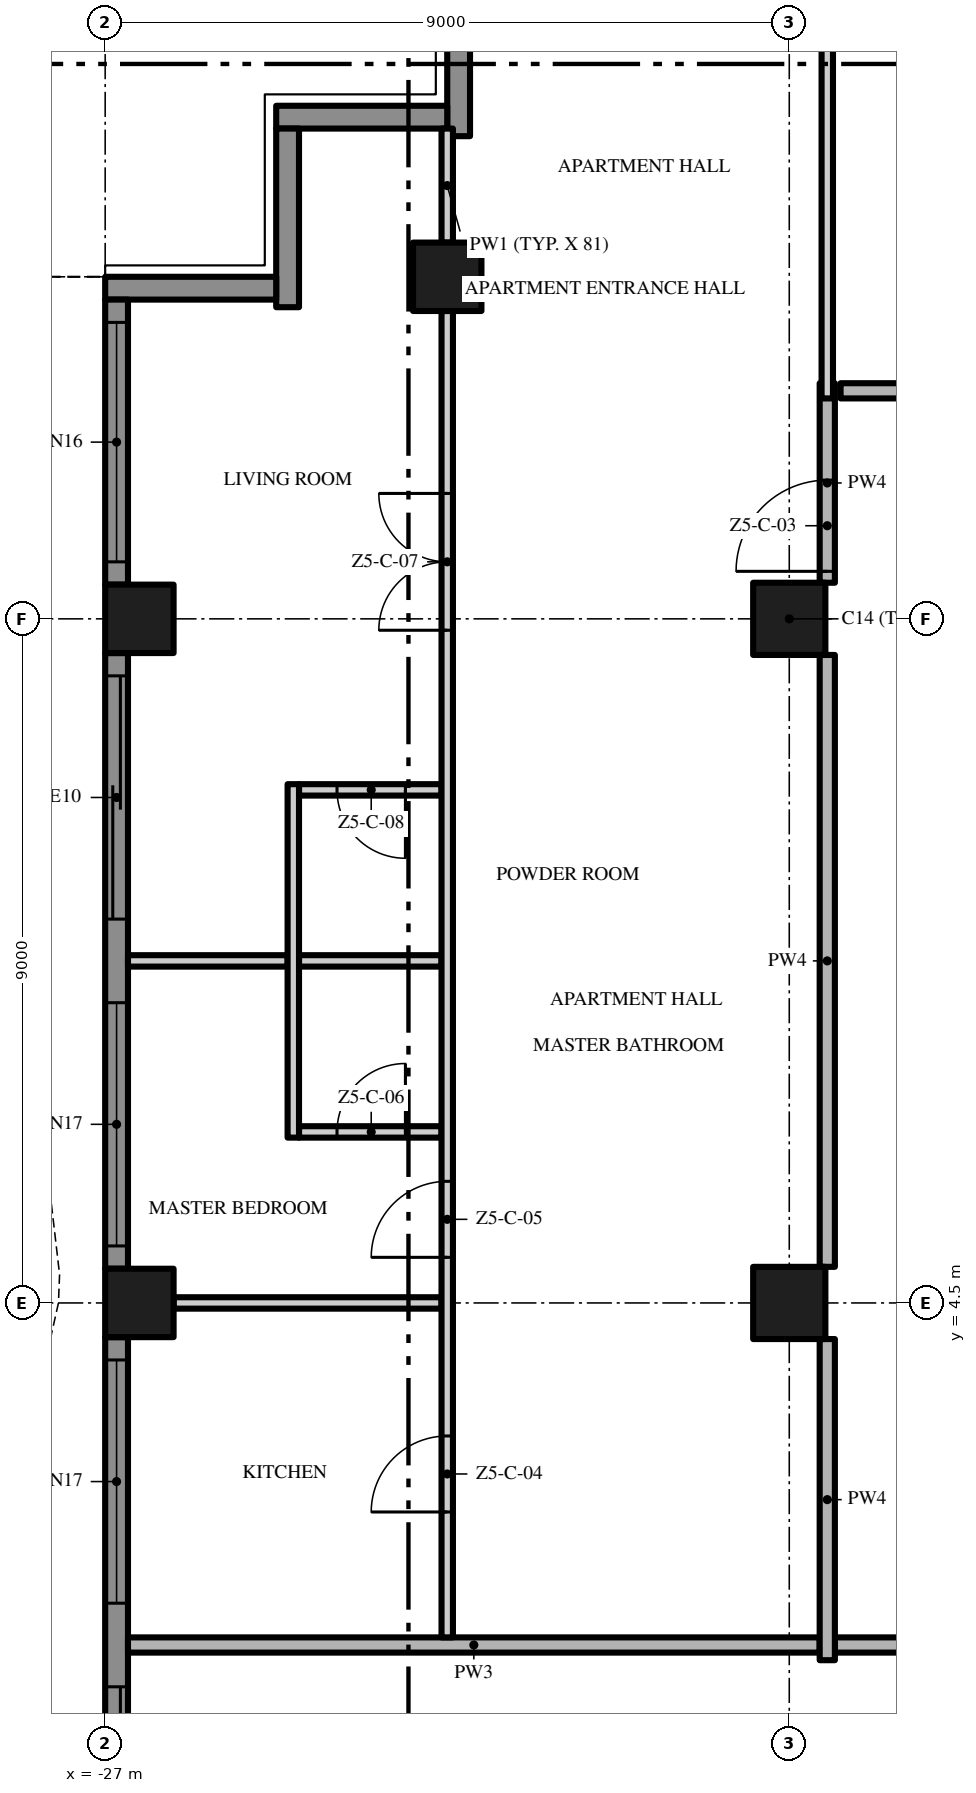
"""IFC4 building model, lengths in metres.
Left out: names, types, materials, properties, quantities, classifications, styles, units other than length and angle.
Written with IfcOpenShell. Run it as: python <this file> out.ifc"""

import sys

from ifc_helpers import new_model, si_unit, direction, frame, frame_2d, origin, origin_2d, place, context, subcontext, project, spatial, polyline, rectangle, outline, extrude, element, fill, save


model = new_model("IFC4")
c1 = context("Model", 3, precision=1e-05, world=origin(), true_north=direction((0.0, 1.0)))
c2 = subcontext(c1, "Body", "Model", "MODEL_VIEW")
j1 = project(units=[si_unit("LENGTHUNIT", "METRE"), si_unit("PLANEANGLEUNIT", "RADIAN")], contexts=[c1])
p1 = place(None, origin())
s1 = spatial("IfcSite", under=j1, at=p1, CompositionType="ELEMENT")
p2 = place(p1, origin())
s2 = spatial("IfcBuilding", under=s1, at=p2, CompositionType="ELEMENT")
p3 = place(p2, frame((0.0, 0.0, 269.2)))
s3 = spatial("IfcBuildingStorey", under=s2, at=p3, CompositionType="ELEMENT", Elevation=269.2)
for number, where, z_axis, x_axis in (
    (1, (-18.0, 13.5, 0.0), (0.0, 0.0, 1.0), (1.0, 0.0, 0.0)),
    (2, (-18.0, 4.5, 0.0), (0.0, 0.0, 1.0), (1.0, 0.0, 0.0)),
):
    element("IfcColumn", number, at=place(p3, frame(where, z_axis=z_axis, x_axis=x_axis)), inside=s3, PredefinedType="COLUMN", context=c2, shape_type="SweptSolid", body=[
        extrude(rectangle(XDim=0.95, YDim=0.95, at=origin_2d()), origin(), (0.0, 0.0, 1.0), 3.5),
    ])
for number, where, z_axis, x_axis in (
    (3, (-26.55, 13.5, 0.0), (0.0, 0.0, 1.0), (1.0, 0.0, 0.0)),
    (4, (-22.5, 18.0, 0.0), (0.0, 0.0, 1.0), (1.0, 0.0, 0.0)),
    (5, (-26.55, 4.5, 0.0), (0.0, 0.0, 1.0), (1.0, 0.0, 0.0)),
):
    element("IfcColumn", number, at=place(p3, frame(where, z_axis=z_axis, x_axis=x_axis)), inside=s3, PredefinedType="COLUMN", context=c2, shape_type="SweptSolid", body=[
        extrude(rectangle(XDim=0.9, YDim=0.9, at=origin_2d()), origin(), (0.0, 0.0, 1.0), 3.5),
    ])
p4 = place(p3, frame((-22.35, 19.85, 0.0), z_axis=(0.0, 0.0, 1.0), x_axis=(0.0, 1.0, 0.0)))
e6 = element("IfcWall", 6, at=p4, inside=s3, PredefinedType="SOLIDWALL", context=c2, shape_type="SweptSolid", body=[
    extrude(rectangle(XDim=2.35, YDim=0.3, at=frame_2d((1.175, 0.0))), origin(), (0.0, 0.0, 1.0), 3.5),
])
p5 = place(p3, frame((-24.75, 20.1, 0.0), z_axis=(0.0, 0.0, 1.0), x_axis=(1.0, 0.0, 0.0)))
e7 = element("IfcWall", 7, at=p5, inside=s3, PredefinedType="SOLIDWALL", context=c2, shape_type="SweptSolid", body=[
    extrude(rectangle(XDim=2.25, YDim=0.3, at=frame_2d((1.125, 0.0))), origin(), (0.0, 0.0, 1.0), 3.5),
])
p6 = place(p3, frame((-24.6, 17.6, 0.0), z_axis=(0.0, 0.0, 1.0), x_axis=(0.0, 1.0, 0.0)))
e8 = element("IfcWall", 8, at=p6, inside=s3, PredefinedType="SOLIDWALL", context=c2, shape_type="SweptSolid", body=[
    extrude(rectangle(XDim=2.35, YDim=0.3, at=frame_2d((1.175, 0.0))), origin(), (0.0, 0.0, 1.0), 3.5),
])
p7 = place(p3, frame((-27.0, 17.85, 0.0), z_axis=(0.0, 0.0, 1.0), x_axis=(1.0, 0.0, 0.0)))
e9 = element("IfcWall", 9, at=p7, inside=s3, PredefinedType="SOLIDWALL", context=c2, shape_type="SweptSolid", body=[
    extrude(rectangle(XDim=2.25, YDim=0.3, at=frame_2d((1.125, 0.0))), origin(), (0.0, 0.0, 1.0), 3.5),
])
p8 = place(p3, frame((-26.85, 13.95, 0.0), z_axis=(0.0, 0.0, 1.0), x_axis=(0.0, 1.0, 0.0)))
e10 = element("IfcWall", 10, at=p8, inside=s3, PredefinedType="SOLIDWALL", context=c2, shape_type="SweptSolid", body=[
    extrude(rectangle(XDim=3.75, YDim=0.3, at=frame_2d((1.875, 0.0))), origin(), (0.0, 0.0, 1.0), 3.5),
])
p9 = place(p8, frame((0.3, 0.0, 0.45)))
e11 = element("IfcOpeningElement", 11, at=p9, cuts=e10, PredefinedType="OPENING", context=c2, shape_type="SweptSolid", body=[
    extrude(rectangle(XDim=3.15, YDim=2.65, at=frame_2d((1.575, 1.325))), frame((0.0, 0.16, 0.0), z_axis=(0.0, -1.0, 0.0), x_axis=(1.0, 0.0, 0.0)), (0.0, 0.0, 1.0), 0.32),
])
p10 = place(p3, frame((-26.85, 4.95, 0.0), z_axis=(0.0, 0.0, 1.0), x_axis=(0.0, 1.0, 0.0)))
e12 = element("IfcWall", 12, at=p10, inside=s3, PredefinedType="SOLIDWALL", context=c2, shape_type="SweptSolid", body=[
    extrude(rectangle(XDim=8.1, YDim=0.3, at=frame_2d((4.05, 0.0))), origin(), (0.0, 0.0, 1.0), 3.5),
])
p11 = place(p10, frame((4.6, 0.0, 0.0)))
e13 = element("IfcOpeningElement", 13, at=p11, cuts=e12, PredefinedType="OPENING", context=c2, shape_type="SweptSolid", body=[
    extrude(rectangle(XDim=3.2, YDim=2.4, at=frame_2d((1.6, 1.2))), frame((0.0, 0.16, 0.0), z_axis=(0.0, -1.0, 0.0), x_axis=(1.0, 0.0, 0.0)), (0.0, 0.0, 1.0), 0.32),
])
p12 = place(p10, frame((0.3, 0.0, 0.45)))
e14 = element("IfcOpeningElement", 14, at=p12, cuts=e12, PredefinedType="OPENING", context=c2, shape_type="SweptSolid", body=[
    extrude(rectangle(XDim=3.2, YDim=2.65, at=frame_2d((1.6, 1.325))), frame((0.0, 0.16, 0.0), z_axis=(0.0, -1.0, 0.0), x_axis=(1.0, 0.0, 0.0)), (0.0, 0.0, 1.0), 0.32),
])
p13 = place(p3, frame((-26.85, -4.05, 0.0), z_axis=(0.0, 0.0, 1.0), x_axis=(0.0, 1.0, 0.0)))
e15 = element("IfcWall", 15, at=p13, inside=s3, PredefinedType="SOLIDWALL", context=c2, shape_type="SweptSolid", body=[
    extrude(rectangle(XDim=8.1, YDim=0.3, at=frame_2d((4.05, 0.0))), origin(), (0.0, 0.0, 1.0), 3.5),
])
p14 = place(p13, frame((4.6, 0.0, 0.45)))
e16 = element("IfcOpeningElement", 16, at=p14, cuts=e15, PredefinedType="OPENING", context=c2, shape_type="SweptSolid", body=[
    extrude(rectangle(XDim=3.2, YDim=2.65, at=frame_2d((1.6, 1.325))), frame((0.0, 0.16, 0.0), z_axis=(0.0, -1.0, 0.0), x_axis=(1.0, 0.0, 0.0)), (0.0, 0.0, 1.0), 0.32),
])
p15 = place(p13, frame((0.3, 0.0, 0.0)))
e17 = element("IfcOpeningElement", 17, at=p15, cuts=e15, PredefinedType="OPENING", context=c2, shape_type="SweptSolid", body=[
    extrude(rectangle(XDim=3.2, YDim=2.4, at=frame_2d((1.6, 1.2))), frame((0.0, 0.16, 0.0), z_axis=(0.0, -1.0, 0.0), x_axis=(1.0, 0.0, 0.0)), (0.0, 0.0, 1.0), 0.32),
])
p16 = place(p3, origin())
e18 = element("IfcWall", 18, at=p16, inside=s3, PredefinedType="USERDEFINED", context=c2, shape_type="SweptSolid", body=[
    extrude(outline(polyline([(-27.951, 18.0), (-28.612, 16.5), (-29.345, 15.0), (-29.869, 13.5), (-30.0, 12.375), (-29.985, 12.0), (-29.649, 10.5), (-28.988, 9.0), (-28.255, 7.5), (-27.731, 6.0), (-27.6, 4.875), (-27.615, 4.5), (-27.951, 3.0), (-28.612, 1.5), (-29.345, 0.0), (-29.869, -1.5), (-30.0, -2.625), (-29.985, -3.0), (-29.649, -4.5), (-28.988, -6.0), (-28.255, -7.5), (-27.731, -9.0), (-27.6, -10.125), (-27.615, -10.5), (-27.951, -12.0), (-28.612, -13.5), (-29.345, -15.0), (-29.869, -16.5), (-30.0, -17.625), (-29.985, -18.0), (-29.735, -17.99), (-29.749, -17.635), (-29.624, -16.556), (-29.114, -15.096), (-28.385, -13.605), (-27.713, -12.079), (-27.366, -10.533), (-27.349, -10.115), (-27.486, -8.944), (-28.024, -7.404), (-28.761, -5.895), (-29.41, -4.421), (-29.736, -2.967), (-29.749, -2.635), (-29.624, -1.556), (-29.114, -0.096), (-28.385, 1.395), (-27.713, 2.921), (-27.366, 4.467), (-27.349, 4.885), (-27.486, 6.056), (-28.024, 7.596), (-28.761, 9.105), (-29.41, 10.579), (-29.736, 12.033), (-29.749, 12.365), (-29.624, 13.444), (-29.114, 14.904), (-28.385, 16.395), (-27.723, 17.899), (-27.951, 18.0)])), origin(), (0.0, 0.0, 1.0), 0.9),
])
p17 = place(p3, frame((17.4, 0.0, 0.0), z_axis=(0.0, 0.0, 1.0), x_axis=(-1.0, 0.0, 0.0)))
e19 = element("IfcWall", 19, at=p17, inside=s3, PredefinedType="PARTITIONING", context=c2, shape_type="SweptSolid", body=[
    extrude(rectangle(XDim=34.8, YDim=0.2, at=frame_2d((17.4, 0.0))), origin(), (0.0, 0.0, 1.0), 3.5),
])
p18 = place(p17, frame((23.4, 0.0, 0.0)))
e20 = element("IfcOpeningElement", 20, at=p18, cuts=e19, PredefinedType="OPENING", context=c2, shape_type="SweptSolid", body=[
    extrude(rectangle(XDim=1.5, YDim=2.4, at=frame_2d((0.75, 1.2))), frame((0.0, 0.11, 0.0), z_axis=(0.0, -1.0, 0.0), x_axis=(1.0, 0.0, 0.0)), (0.0, 0.0, 1.0), 0.22),
])
p19 = place(p17, frame((5.4, 0.0, 0.0)))
e21 = element("IfcOpeningElement", 21, at=p19, cuts=e19, PredefinedType="OPENING", context=c2, shape_type="SweptSolid", body=[
    extrude(rectangle(XDim=1.5, YDim=2.4, at=frame_2d((0.75, 1.2))), frame((0.0, 0.11, 0.0), z_axis=(0.0, -1.0, 0.0), x_axis=(1.0, 0.0, 0.0)), (0.0, 0.0, 1.0), 0.22),
])
p20 = place(p3, frame((-26.7, 0.0, 0.0), z_axis=(0.0, 0.0, 1.0), x_axis=(1.0, 0.0, 0.0)))
e22 = element("IfcWall", 22, at=p20, inside=s3, PredefinedType="PARTITIONING", context=c2, shape_type="SweptSolid", body=[
    extrude(rectangle(XDim=9.1, YDim=0.2, at=frame_2d((4.55, 0.0))), origin(), (0.0, 0.0, 1.0), 3.5),
])
p21 = place(p3, frame((-26.1, 4.5, 0.0), z_axis=(0.0, 0.0, 1.0), x_axis=(1.0, 0.0, 0.0)))
e23 = element("IfcWall", 23, at=p21, inside=s3, PredefinedType="PARTITIONING", context=c2, shape_type="SweptSolid", body=[
    extrude(rectangle(XDim=3.525, YDim=0.15, at=frame_2d((1.762, 0.0))), origin(), (0.0, 0.0, 1.0), 3.5),
])
p22 = place(p3, frame((-24.45, 6.75, 0.0), z_axis=(0.0, 0.0, 1.0), x_axis=(1.0, 0.0, 0.0)))
e24 = element("IfcWall", 24, at=p22, inside=s3, PredefinedType="PARTITIONING", context=c2, shape_type="SweptSolid", body=[
    extrude(rectangle(XDim=1.875, YDim=0.15, at=frame_2d((0.938, 0.0))), origin(), (0.0, 0.0, 1.0), 3.5),
])
p23 = place(p22, frame((0.5, 0.0, 0.0)))
e25 = element("IfcOpeningElement", 25, at=p23, cuts=e24, PredefinedType="OPENING", context=c2, shape_type="SweptSolid", body=[
    extrude(rectangle(XDim=0.9, YDim=2.1, at=frame_2d((0.45, 1.05))), frame((0.0, 0.085, 0.0), z_axis=(0.0, -1.0, 0.0), x_axis=(1.0, 0.0, 0.0)), (0.0, 0.0, 1.0), 0.17),
])
p24 = place(p3, frame((-26.7, 9.0, 0.0), z_axis=(0.0, 0.0, 1.0), x_axis=(1.0, 0.0, 0.0)))
e26 = element("IfcWall", 26, at=p24, inside=s3, PredefinedType="PARTITIONING", context=c2, shape_type="SweptSolid", body=[
    extrude(rectangle(XDim=2.1, YDim=0.15, at=frame_2d((1.05, 0.0))), origin(), (0.0, 0.0, 1.0), 3.5),
])
p25 = place(p3, frame((-24.45, 9.0, 0.0), z_axis=(0.0, 0.0, 1.0), x_axis=(1.0, 0.0, 0.0)))
e27 = element("IfcWall", 27, at=p25, inside=s3, PredefinedType="PARTITIONING", context=c2, shape_type="SweptSolid", body=[
    extrude(rectangle(XDim=1.875, YDim=0.15, at=frame_2d((0.938, 0.0))), origin(), (0.0, 0.0, 1.0), 3.5),
])
p26 = place(p3, frame((-22.575, 11.25, 0.0), z_axis=(0.0, 0.0, 1.0), x_axis=(-1.0, 0.0, 0.0)))
e28 = element("IfcWall", 28, at=p26, inside=s3, PredefinedType="PARTITIONING", context=c2, shape_type="SweptSolid", body=[
    extrude(rectangle(XDim=1.875, YDim=0.15, at=frame_2d((0.938, 0.0))), origin(), (0.0, 0.0, 1.0), 3.5),
])
p27 = place(p26, frame((0.475, 0.0, 0.0)))
e29 = element("IfcOpeningElement", 29, at=p27, cuts=e28, PredefinedType="OPENING", context=c2, shape_type="SweptSolid", body=[
    extrude(rectangle(XDim=0.9, YDim=2.1, at=frame_2d((0.45, 1.05))), frame((0.0, 0.085, 0.0), z_axis=(0.0, -1.0, 0.0), x_axis=(1.0, 0.0, 0.0)), (0.0, 0.0, 1.0), 0.17),
])
p28 = place(p3, frame((-17.325, 16.5, 0.0), z_axis=(0.0, 0.0, 1.0), x_axis=(1.0, 0.0, 0.0)))
e30 = element("IfcWall", 30, at=p28, inside=s3, PredefinedType="PARTITIONING", context=c2, shape_type="SweptSolid", body=[
    extrude(rectangle(XDim=3.825, YDim=0.2, at=frame_2d((1.913, 0.0))), origin(), (0.0, 0.0, 1.0), 3.5),
])
p29 = place(p28, frame((1.35, 0.0, 0.0)))
e31 = element("IfcOpeningElement", 31, at=p29, cuts=e30, PredefinedType="OPENING", context=c2, shape_type="SweptSolid", body=[
    extrude(rectangle(XDim=0.9, YDim=2.1, at=frame_2d((0.45, 1.05))), frame((0.0, 0.11, 0.0), z_axis=(0.0, -1.0, 0.0), x_axis=(1.0, 0.0, 0.0)), (0.0, 0.0, 1.0), 0.22),
])
p30 = place(p3, frame((-24.525, 6.675, 0.0), z_axis=(0.0, 0.0, 1.0), x_axis=(0.0, 1.0, 0.0)))
e32 = element("IfcWall", 32, at=p30, inside=s3, PredefinedType="PARTITIONING", context=c2, shape_type="SweptSolid", body=[
    extrude(rectangle(XDim=4.65, YDim=0.15, at=frame_2d((2.325, 0.0))), origin(), (0.0, 0.0, 1.0), 3.5),
])
p31 = place(p3, frame((-22.5, 0.1, 0.0), z_axis=(0.0, 0.0, 1.0), x_axis=(0.0, 1.0, 0.0)))
e33 = element("IfcWall", 33, at=p31, inside=s3, PredefinedType="PARTITIONING", context=c2, shape_type="SweptSolid", body=[
    extrude(rectangle(XDim=17.45, YDim=0.15, at=frame_2d((8.725, 0.0))), origin(), (0.0, 0.0, 1.0), 3.5),
])
p32 = place(p31, frame((1.65, 0.0, 0.0)))
e34 = element("IfcOpeningElement", 34, at=p32, cuts=e33, PredefinedType="OPENING", context=c2, shape_type="SweptSolid", body=[
    extrude(rectangle(XDim=1.0, YDim=2.4, at=frame_2d((0.5, 1.2))), frame((0.0, 0.085, 0.0), z_axis=(0.0, -1.0, 0.0), x_axis=(1.0, 0.0, 0.0)), (0.0, 0.0, 1.0), 0.17),
])
p33 = place(p31, frame((5.0, 0.0, 0.0)))
e35 = element("IfcOpeningElement", 35, at=p33, cuts=e33, PredefinedType="OPENING", context=c2, shape_type="SweptSolid", body=[
    extrude(rectangle(XDim=1.0, YDim=2.4, at=frame_2d((0.5, 1.2))), frame((0.0, 0.085, 0.0), z_axis=(0.0, -1.0, 0.0), x_axis=(1.0, 0.0, 0.0)), (0.0, 0.0, 1.0), 0.17),
])
p34 = place(p31, frame((13.25, 0.0, 0.0)))
e36 = element("IfcOpeningElement", 36, at=p34, cuts=e33, PredefinedType="OPENING", context=c2, shape_type="SweptSolid", body=[
    extrude(rectangle(XDim=1.8, YDim=2.4, at=frame_2d((0.9, 1.2))), frame((0.0, 0.085, 0.0), z_axis=(0.0, -1.0, 0.0), x_axis=(1.0, 0.0, 0.0)), (0.0, 0.0, 1.0), 0.17),
])
p35 = place(p3, frame((-22.5, 18.45, 0.0), z_axis=(0.0, 0.0, 1.0), x_axis=(0.0, 1.0, 0.0)))
e37 = element("IfcWall", 37, at=p35, inside=s3, PredefinedType="PARTITIONING", context=c2, shape_type="SweptSolid", body=[
    extrude(rectangle(XDim=1.5, YDim=0.15, at=frame_2d((0.75, 0.0))), origin(), (0.0, 0.0, 1.0), 3.5),
])
p36 = place(p3, frame((-17.5, -0.2, 0.0), z_axis=(0.0, 0.0, 1.0), x_axis=(0.0, 1.0, 0.0)))
e38 = element("IfcWall", 38, at=p36, inside=s3, PredefinedType="PARTITIONING", context=c2, shape_type="SweptSolid", body=[
    extrude(rectangle(XDim=4.225, YDim=0.2, at=frame_2d((2.112, 0.0))), origin(), (0.0, 0.0, 1.0), 3.5),
])
p37 = place(p3, frame((-17.5, 4.975, 0.0), z_axis=(0.0, 0.0, 1.0), x_axis=(0.0, 1.0, 0.0)))
e39 = element("IfcWall", 39, at=p37, inside=s3, PredefinedType="PARTITIONING", context=c2, shape_type="SweptSolid", body=[
    extrude(rectangle(XDim=8.05, YDim=0.2, at=frame_2d((4.025, 0.0))), origin(), (0.0, 0.0, 1.0), 3.5),
])
p38 = place(p3, frame((-17.5, 13.975, 0.0), z_axis=(0.0, 0.0, 1.0), x_axis=(0.0, 1.0, 0.0)))
e40 = element("IfcWall", 40, at=p38, inside=s3, PredefinedType="PARTITIONING", context=c2, shape_type="SweptSolid", body=[
    extrude(rectangle(XDim=2.625, YDim=0.2, at=frame_2d((1.312, 0.0))), origin(), (0.0, 0.0, 1.0), 3.5),
])
p39 = place(p38, frame((0.15, 0.0, 0.0)))
e41 = element("IfcOpeningElement", 41, at=p39, cuts=e40, PredefinedType="OPENING", context=c2, shape_type="SweptSolid", body=[
    extrude(rectangle(XDim=1.2, YDim=2.4, at=frame_2d((0.6, 1.2))), frame((0.0, 0.11, 0.0), z_axis=(0.0, -1.0, 0.0), x_axis=(1.0, 0.0, 0.0)), (0.0, 0.0, 1.0), 0.22),
])
p40 = place(p3, frame((-17.5, 16.4, 0.0), z_axis=(0.0, 0.0, 1.0), x_axis=(0.0, 1.0, 0.0)))
e42 = element("IfcWall", 42, at=p40, inside=s3, PredefinedType="PARTITIONING", context=c2, shape_type="SweptSolid", body=[
    extrude(rectangle(XDim=5.2, YDim=0.15, at=frame_2d((2.6, 0.0))), origin(), (0.0, 0.0, 1.0), 3.5),
])
p41 = place(p9, origin())
e43 = element("IfcWindow", 43, at=p41, inside=s3, PartitioningType="SINGLE_PANEL", PredefinedType="WINDOW", context=c2, shape_type="SweptSolid", body=[
    extrude(rectangle(XDim=3.15, YDim=2.65, at=frame_2d((1.575, 1.325))), frame((0.0, 0.03, 0.0), z_axis=(0.0, -1.0, 0.0), x_axis=(1.0, 0.0, 0.0)), (0.0, 0.0, 1.0), 0.06),
])
fill(e11, e43)
p42 = place(p11, origin())
e44 = element("IfcDoor", 44, at=p42, inside=s3, OperationType="SINGLE_SWING_LEFT", PredefinedType="DOOR", context=c2, shape_type="SweptSolid", body=[
    extrude(rectangle(XDim=3.2, YDim=2.4, at=frame_2d((1.6, 1.2))), frame((0.0, 0.025, 0.0), z_axis=(0.0, -1.0, 0.0), x_axis=(1.0, 0.0, 0.0)), (0.0, 0.0, 1.0), 0.05),
])
fill(e13, e44)
p43 = place(p12, origin())
e45 = element("IfcWindow", 45, at=p43, inside=s3, PartitioningType="SINGLE_PANEL", PredefinedType="WINDOW", context=c2, shape_type="SweptSolid", body=[
    extrude(rectangle(XDim=3.2, YDim=2.65, at=frame_2d((1.6, 1.325))), frame((0.0, 0.03, 0.0), z_axis=(0.0, -1.0, 0.0), x_axis=(1.0, 0.0, 0.0)), (0.0, 0.0, 1.0), 0.06),
])
fill(e14, e45)
p44 = place(p14, origin())
e46 = element("IfcWindow", 46, at=p44, inside=s3, PartitioningType="SINGLE_PANEL", PredefinedType="WINDOW", context=c2, shape_type="SweptSolid", body=[
    extrude(rectangle(XDim=3.2, YDim=2.65, at=frame_2d((1.6, 1.325))), frame((0.0, 0.03, 0.0), z_axis=(0.0, -1.0, 0.0), x_axis=(1.0, 0.0, 0.0)), (0.0, 0.0, 1.0), 0.06),
])
fill(e16, e46)
p45 = place(p15, origin())
e47 = element("IfcDoor", 47, at=p45, inside=s3, OperationType="SINGLE_SWING_LEFT", PredefinedType="DOOR", context=c2, shape_type="SweptSolid", body=[
    extrude(rectangle(XDim=3.2, YDim=2.4, at=frame_2d((1.6, 1.2))), frame((0.0, 0.025, 0.0), z_axis=(0.0, -1.0, 0.0), x_axis=(1.0, 0.0, 0.0)), (0.0, 0.0, 1.0), 0.05),
])
fill(e17, e47)
p46 = place(p39, origin())
e48 = element("IfcDoor", 48, at=p46, inside=s3, OperationType="SINGLE_SWING_LEFT", PredefinedType="DOOR", context=c2, shape_type="SweptSolid", body=[
    extrude(rectangle(XDim=1.2, YDim=2.4, at=frame_2d((0.6, 1.2))), frame((0.0, 0.025, 0.0), z_axis=(0.0, -1.0, 0.0), x_axis=(1.0, 0.0, 0.0)), (0.0, 0.0, 1.0), 0.05),
])
fill(e41, e48)
p47 = place(p32, origin())
e49 = element("IfcDoor", 49, at=p47, inside=s3, OperationType="SINGLE_SWING_LEFT", PredefinedType="DOOR", context=c2, shape_type="SweptSolid", body=[
    extrude(rectangle(XDim=1.0, YDim=2.4, at=frame_2d((0.5, 1.2))), frame((0.0, 0.025, 0.0), z_axis=(0.0, -1.0, 0.0), x_axis=(1.0, 0.0, 0.0)), (0.0, 0.0, 1.0), 0.05),
])
fill(e34, e49)
p48 = place(p33, origin())
e50 = element("IfcDoor", 50, at=p48, inside=s3, OperationType="SINGLE_SWING_LEFT", PredefinedType="DOOR", context=c2, shape_type="SweptSolid", body=[
    extrude(rectangle(XDim=1.0, YDim=2.4, at=frame_2d((0.5, 1.2))), frame((0.0, 0.025, 0.0), z_axis=(0.0, -1.0, 0.0), x_axis=(1.0, 0.0, 0.0)), (0.0, 0.0, 1.0), 0.05),
])
fill(e35, e50)
p49 = place(p23, origin())
e51 = element("IfcDoor", 51, at=p49, inside=s3, OperationType="SINGLE_SWING_RIGHT", PredefinedType="DOOR", context=c2, shape_type="SweptSolid", body=[
    extrude(rectangle(XDim=0.9, YDim=2.1, at=frame_2d((0.45, 1.05))), frame((0.0, 0.025, 0.0), z_axis=(0.0, -1.0, 0.0), x_axis=(1.0, 0.0, 0.0)), (0.0, 0.0, 1.0), 0.05),
])
fill(e25, e51)
p50 = place(p34, origin())
e52 = element("IfcDoor", 52, at=p50, inside=s3, OperationType="DOUBLE_DOOR_SINGLE_SWING", PredefinedType="DOOR", context=c2, shape_type="SweptSolid", body=[
    extrude(rectangle(XDim=1.8, YDim=2.4, at=frame_2d((0.9, 1.2))), frame((0.0, 0.025, 0.0), z_axis=(0.0, -1.0, 0.0), x_axis=(1.0, 0.0, 0.0)), (0.0, 0.0, 1.0), 0.05),
])
fill(e36, e52)
p51 = place(p27, origin())
e53 = element("IfcDoor", 53, at=p51, inside=s3, OperationType="SINGLE_SWING_LEFT", PredefinedType="DOOR", context=c2, shape_type="SweptSolid", body=[
    extrude(rectangle(XDim=0.9, YDim=2.1, at=frame_2d((0.45, 1.05))), frame((0.0, 0.025, 0.0), z_axis=(0.0, -1.0, 0.0), x_axis=(1.0, 0.0, 0.0)), (0.0, 0.0, 1.0), 0.05),
])
fill(e29, e53)
save(model, sys.argv[1])
